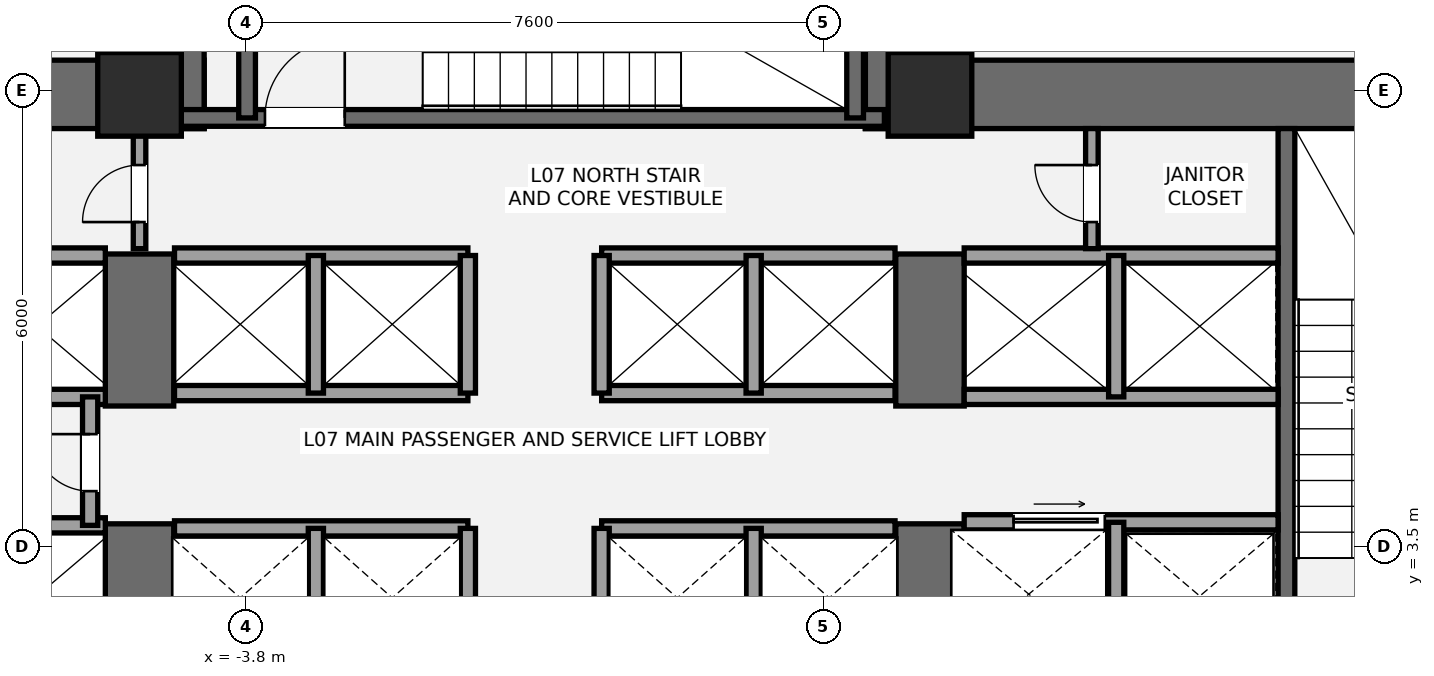
"""IFC4 building model, lengths in metres.
Left out: names, types, materials, properties, quantities, classifications, styles, units other than length and angle.
Written with IfcOpenShell. Run it as: python <this file> out.ifc"""

import sys

from ifc_helpers import new_model, si_unit, direction, frame, frame_2d, origin, origin_2d, place, context, subcontext, project, spatial, rectangle, extrude, element, fill, save


model = new_model("IFC4")
c1 = context("Model", 3, precision=1e-05, world=origin(), true_north=direction((0.0, 1.0)))
c2 = subcontext(c1, "Body", "Model", "MODEL_VIEW")
j1 = project(units=[si_unit("LENGTHUNIT", "METRE"), si_unit("PLANEANGLEUNIT", "RADIAN")], contexts=[c1])
p1 = place(None, origin())
s1 = spatial("IfcSite", under=j1, at=p1, CompositionType="ELEMENT")
p2 = place(p1, origin())
s2 = spatial("IfcBuilding", under=s1, at=p2, CompositionType="ELEMENT")
p3 = place(p2, frame((0.0, 0.0, 30.6)))
s3 = spatial("IfcBuildingStorey", under=s2, at=p3, CompositionType="ELEMENT", Elevation=30.6)
p4 = place(p3, frame((-14.05, 9.45, 0.0), z_axis=(0.0, 0.0, 1.0), x_axis=(1.0, 0.0, 0.0)))
e1 = element("IfcWall", 1, at=p4, inside=s3, PredefinedType="SHEAR", context=c2, shape_type="SweptSolid", body=[
    extrude(rectangle(XDim=9.7, YDim=0.9, at=frame_2d((4.85, 0.0))), origin(), (0.0, 0.0, 1.0), 3.6),
])
p5 = place(p3, frame((-5.2, 0.95, 0.0), z_axis=(0.0, 0.0, 1.0), x_axis=(0.0, 1.0, 0.0)))
e2 = element("IfcWall", 2, at=p5, inside=s3, PredefinedType="SHEAR", context=c2, shape_type="SweptSolid", body=[
    extrude(rectangle(XDim=2.85, YDim=0.9, at=frame_2d((1.425, 0.0))), origin(), (0.0, 0.0, 1.0), 3.6),
])
p6 = place(p3, frame((-5.2, 5.35, 0.0), z_axis=(0.0, 0.0, 1.0), x_axis=(0.0, 1.0, 0.0)))
e3 = element("IfcWall", 3, at=p6, inside=s3, PredefinedType="SHEAR", context=c2, shape_type="SweptSolid", body=[
    extrude(rectangle(XDim=2.0, YDim=0.9, at=frame_2d((1.0, 0.0))), origin(), (0.0, 0.0, 1.0), 3.6),
])
p7 = place(p3, frame((4.35, 9.45, 0.0), z_axis=(0.0, 0.0, 1.0), x_axis=(1.0, 0.0, 0.0)))
e4 = element("IfcWall", 4, at=p7, inside=s3, PredefinedType="SHEAR", context=c2, shape_type="SweptSolid", body=[
    extrude(rectangle(XDim=9.7, YDim=0.9, at=frame_2d((4.85, 0.0))), origin(), (0.0, 0.0, 1.0), 3.6),
])
p8 = place(p3, frame((5.2, 0.95, 0.0), z_axis=(0.0, 0.0, 1.0), x_axis=(0.0, 1.0, 0.0)))
e5 = element("IfcWall", 5, at=p8, inside=s3, PredefinedType="SHEAR", context=c2, shape_type="SweptSolid", body=[
    extrude(rectangle(XDim=2.85, YDim=0.9, at=frame_2d((1.425, 0.0))), origin(), (0.0, 0.0, 1.0), 3.6),
])
p9 = place(p3, frame((5.2, 5.35, 0.0), z_axis=(0.0, 0.0, 1.0), x_axis=(0.0, 1.0, 0.0)))
e6 = element("IfcWall", 6, at=p9, inside=s3, PredefinedType="SHEAR", context=c2, shape_type="SweptSolid", body=[
    extrude(rectangle(XDim=2.0, YDim=0.9, at=frame_2d((1.0, 0.0))), origin(), (0.0, 0.0, 1.0), 3.6),
])
p10 = place(p3, frame((9.89, 1.85, 0.0), z_axis=(0.0, 0.0, 1.0), x_axis=(0.0, 1.0, 0.0)))
e7 = element("IfcWall", 7, at=p10, inside=s3, PredefinedType="SHEAR", context=c2, shape_type="SweptSolid", body=[
    extrude(rectangle(XDim=7.15, YDim=0.22, at=frame_2d((3.575, 0.0))), origin(), (0.0, 0.0, 1.0), 3.6),
])
for number, where, z_axis, x_axis in (
    (8, (-4.8, 9.0, 0.0), (0.0, 0.0, 1.0), (0.0, 1.0, 0.0)),
    (9, (4.8, 9.0, 0.0), (0.0, 0.0, 1.0), (0.0, 1.0, 0.0)),
):
    element("IfcWall", number, at=place(p3, frame(where, z_axis=z_axis, x_axis=x_axis)), inside=s3, PredefinedType="SHEAR", context=c2, shape_type="SweptSolid", body=[
        extrude(rectangle(XDim=4.3, YDim=0.9, at=frame_2d((2.15, 0.0))), origin(), (0.0, 0.0, 1.0), 3.6),
    ])
p11 = place(p3, frame((-4.7, 9.14, 0.0), z_axis=(0.0, 0.0, 1.0), x_axis=(1.0, 0.0, 0.0)))
e10 = element("IfcWall", 10, at=p11, inside=s3, PredefinedType="SHEAR", context=c2, shape_type="SweptSolid", body=[
    extrude(rectangle(XDim=9.3, YDim=0.22, at=frame_2d((4.65, 0.0))), origin(), (0.0, 0.0, 1.0), 3.6),
])
p12 = place(p11, frame((1.15, 0.0, 0.0)))
e11 = element("IfcOpeningElement", 11, at=p12, cuts=e10, PredefinedType="OPENING", context=c2, shape_type="SweptSolid", body=[
    extrude(rectangle(XDim=1.05, YDim=2.15, at=frame_2d((0.525, 1.075))), frame((0.0, 0.12, 0.0), z_axis=(0.0, -1.0, 0.0), x_axis=(1.0, 0.0, 0.0)), (0.0, 0.0, 1.0), 0.24),
])
for number, where, z_axis, x_axis in (
    (12, (-3.785, 9.14, 0.0), (0.0, 0.0, 1.0), (0.0, 1.0, 0.0)),
    (13, (4.215, 9.14, 0.0), (0.0, 0.0, 1.0), (0.0, 1.0, 0.0)),
):
    element("IfcWall", number, at=place(p3, frame(where, z_axis=z_axis, x_axis=x_axis)), inside=s3, PredefinedType="SHEAR", context=c2, shape_type="SweptSolid", body=[
        extrude(rectangle(XDim=3.26, YDim=0.22, at=frame_2d((1.63, 0.0))), origin(), (0.0, 0.0, 1.0), 3.6),
    ])
for number, where, z_axis, x_axis in (
    (14, (-5.2, 9.45, 0.0), (0.0, 0.0, 1.0), (1.0, 0.0, 0.0)),
    (15, (5.2, 9.45, 0.0), (0.0, 0.0, 1.0), (1.0, 0.0, 0.0)),
):
    element("IfcColumn", number, at=place(p3, frame(where, z_axis=z_axis, x_axis=x_axis)), inside=s3, PredefinedType="COLUMN", context=c2, shape_type="SweptSolid", body=[
        extrude(rectangle(XDim=1.1, YDim=1.1, at=origin_2d()), origin(), (0.0, 0.0, 1.0), 3.6),
    ])
for number, where, z_axis, x_axis in (
    (16, (-9.78, 3.78, 0.0), (0.0, 0.0, 1.0), (1.0, 0.0, 0.0)),
    (17, (-9.78, 5.47, 0.0), (0.0, 0.0, 1.0), (1.0, 0.0, 0.0)),
    (18, (-9.78, 7.33, 0.0), (0.0, 0.0, 1.0), (1.0, 0.0, 0.0)),
):
    element("IfcWall", number, at=place(p3, frame(where, z_axis=z_axis, x_axis=x_axis)), inside=s3, PredefinedType="SOLIDWALL", context=c2, shape_type="SweptSolid", body=[
        extrude(rectangle(XDim=4.13, YDim=0.2, at=frame_2d((2.065, 0.0))), origin(), (0.0, 0.0, 1.0), 3.4),
    ])
p13 = place(p3, frame((-5.85, 3.78, 0.0), z_axis=(0.0, 0.0, 1.0), x_axis=(0.0, 1.0, 0.0)))
e19 = element("IfcWall", 19, at=p13, inside=s3, PredefinedType="SOLIDWALL", context=c2, shape_type="SweptSolid", body=[
    extrude(rectangle(XDim=1.69, YDim=0.2, at=frame_2d((0.845, 0.0))), origin(), (0.0, 0.0, 1.0), 3.4),
])
p14 = place(p13, frame((0.45, 0.0, 0.0)))
e20 = element("IfcOpeningElement", 20, at=p14, cuts=e19, PredefinedType="OPENING", context=c2, shape_type="SweptSolid", body=[
    extrude(rectangle(XDim=0.75, YDim=2.1, at=frame_2d((0.375, 1.05))), frame((0.0, 0.11, 0.0), z_axis=(0.0, -1.0, 0.0), x_axis=(1.0, 0.0, 0.0)), (0.0, 0.0, 1.0), 0.22),
])
p15 = place(p3, frame((5.65, 3.82, 0.0), z_axis=(0.0, 0.0, 1.0), x_axis=(1.0, 0.0, 0.0)))
e21 = element("IfcWall", 21, at=p15, inside=s3, PredefinedType="SOLIDWALL", context=c2, shape_type="SweptSolid", body=[
    extrude(rectangle(XDim=4.13, YDim=0.2, at=frame_2d((2.065, 0.0))), origin(), (0.0, 0.0, 1.0), 3.4),
])
p16 = place(p15, frame((0.65, 0.0, 0.0)))
e22 = element("IfcOpeningElement", 22, at=p16, cuts=e21, PredefinedType="OPENING", context=c2, shape_type="SweptSolid", body=[
    extrude(rectangle(XDim=1.2, YDim=2.2, at=frame_2d((0.6, 1.1))), frame((0.0, 0.11, 0.0), z_axis=(0.0, -1.0, 0.0), x_axis=(1.0, 0.0, 0.0)), (0.0, 0.0, 1.0), 0.22),
])
p17 = place(p3, frame((7.65, 1.85, 0.0), z_axis=(0.0, 0.0, 1.0), x_axis=(0.0, 1.0, 0.0)))
e23 = element("IfcWall", 23, at=p17, inside=s3, PredefinedType="SOLIDWALL", context=c2, shape_type="SweptSolid", body=[
    extrude(rectangle(XDim=1.97, YDim=0.2, at=frame_2d((0.985, 0.0))), origin(), (0.0, 0.0, 1.0), 3.4),
])
for number, where, z_axis, x_axis in (
    (24, (5.65, 5.47, 0.0), (0.0, 0.0, 1.0), (1.0, 0.0, 0.0)),
    (25, (5.65, 7.33, 0.0), (0.0, 0.0, 1.0), (1.0, 0.0, 0.0)),
):
    element("IfcWall", number, at=place(p3, frame(where, z_axis=z_axis, x_axis=x_axis)), inside=s3, PredefinedType="SOLIDWALL", context=c2, shape_type="SweptSolid", body=[
        extrude(rectangle(XDim=4.13, YDim=0.2, at=frame_2d((2.065, 0.0))), origin(), (0.0, 0.0, 1.0), 3.4),
    ])
p18 = place(p3, frame((7.65, 5.47, 0.0), z_axis=(0.0, 0.0, 1.0), x_axis=(0.0, 1.0, 0.0)))
e26 = element("IfcWall", 26, at=p18, inside=s3, PredefinedType="SOLIDWALL", context=c2, shape_type="SweptSolid", body=[
    extrude(rectangle(XDim=1.86, YDim=0.2, at=frame_2d((0.93, 0.0))), origin(), (0.0, 0.0, 1.0), 3.4),
])
for number, where, z_axis, x_axis in (
    (27, (-4.74, 3.74, 0.0), (0.0, 0.0, 1.0), (1.0, 0.0, 0.0)),
    (28, (0.88, 3.74, 0.0), (0.0, 0.0, 1.0), (1.0, 0.0, 0.0)),
):
    element("IfcWall", number, at=place(p3, frame(where, z_axis=z_axis, x_axis=x_axis)), inside=s3, PredefinedType="SOLIDWALL", context=c2, shape_type="SweptSolid", body=[
        extrude(rectangle(XDim=3.86, YDim=0.2, at=frame_2d((1.93, 0.0))), origin(), (0.0, 0.0, 1.0), 3.4),
    ])
for number, where, z_axis, x_axis in (
    (29, (-2.88, 1.92, 0.0), (0.0, 0.0, 1.0), (0.0, 1.0, 0.0)),
    (30, (2.88, 1.92, 0.0), (0.0, 0.0, 1.0), (0.0, 1.0, 0.0)),
    (31, (-0.88, 1.92, 0.0), (0.0, 0.0, 1.0), (0.0, 1.0, 0.0)),
    (32, (0.88, 1.92, 0.0), (0.0, 0.0, 1.0), (0.0, 1.0, 0.0)),
):
    element("IfcWall", number, at=place(p3, frame(where, z_axis=z_axis, x_axis=x_axis)), inside=s3, PredefinedType="SOLIDWALL", context=c2, shape_type="SweptSolid", body=[
        extrude(rectangle(XDim=1.82, YDim=0.2, at=frame_2d((0.91, 0.0))), origin(), (0.0, 0.0, 1.0), 3.4),
    ])
for number, where, z_axis, x_axis in (
    (33, (-4.74, 5.52, 0.0), (0.0, 0.0, 1.0), (1.0, 0.0, 0.0)),
    (34, (0.88, 5.52, 0.0), (0.0, 0.0, 1.0), (1.0, 0.0, 0.0)),
    (35, (-4.74, 7.33, 0.0), (0.0, 0.0, 1.0), (1.0, 0.0, 0.0)),
    (36, (0.88, 7.33, 0.0), (0.0, 0.0, 1.0), (1.0, 0.0, 0.0)),
):
    element("IfcWall", number, at=place(p3, frame(where, z_axis=z_axis, x_axis=x_axis)), inside=s3, PredefinedType="SOLIDWALL", context=c2, shape_type="SweptSolid", body=[
        extrude(rectangle(XDim=3.86, YDim=0.2, at=frame_2d((1.93, 0.0))), origin(), (0.0, 0.0, 1.0), 3.4),
    ])
for number, where, z_axis, x_axis in (
    (37, (-2.88, 5.52, 0.0), (0.0, 0.0, 1.0), (0.0, 1.0, 0.0)),
    (38, (2.88, 5.52, 0.0), (0.0, 0.0, 1.0), (0.0, 1.0, 0.0)),
    (39, (-0.88, 5.52, 0.0), (0.0, 0.0, 1.0), (0.0, 1.0, 0.0)),
    (40, (0.88, 5.52, 0.0), (0.0, 0.0, 1.0), (0.0, 1.0, 0.0)),
):
    element("IfcWall", number, at=place(p3, frame(where, z_axis=z_axis, x_axis=x_axis)), inside=s3, PredefinedType="SOLIDWALL", context=c2, shape_type="SweptSolid", body=[
        extrude(rectangle(XDim=1.81, YDim=0.2, at=frame_2d((0.905, 0.0))), origin(), (0.0, 0.0, 1.0), 3.4),
    ])
p19 = place(p3, frame((-5.2, 7.42, 0.0), z_axis=(0.0, 0.0, 1.0), x_axis=(0.0, 1.0, 0.0)))
e41 = element("IfcWall", 41, at=p19, inside=s3, PredefinedType="PARTITIONING", context=c2, shape_type="SweptSolid", body=[
    extrude(rectangle(XDim=1.58, YDim=0.165, at=frame_2d((0.79, 0.0))), origin(), (0.0, 0.0, 1.0), 3.4),
])
p20 = place(p19, frame((0.35, 0.0, 0.0)))
e42 = element("IfcOpeningElement", 42, at=p20, cuts=e41, PredefinedType="OPENING", context=c2, shape_type="SweptSolid", body=[
    extrude(rectangle(XDim=0.75, YDim=2.1, at=frame_2d((0.375, 1.05))), frame((0.0, 0.093, 0.0), z_axis=(0.0, -1.0, 0.0), x_axis=(1.0, 0.0, 0.0)), (0.0, 0.0, 1.0), 0.185),
])
p21 = place(p3, frame((7.33, 7.42, 0.0), z_axis=(0.0, 0.0, 1.0), x_axis=(0.0, 1.0, 0.0)))
e43 = element("IfcWall", 43, at=p21, inside=s3, PredefinedType="PARTITIONING", context=c2, shape_type="SweptSolid", body=[
    extrude(rectangle(XDim=1.58, YDim=0.165, at=frame_2d((0.79, 0.0))), origin(), (0.0, 0.0, 1.0), 3.4),
])
p22 = place(p21, frame((0.35, 0.0, 0.0)))
e44 = element("IfcOpeningElement", 44, at=p22, cuts=e43, PredefinedType="OPENING", context=c2, shape_type="SweptSolid", body=[
    extrude(rectangle(XDim=0.75, YDim=2.1, at=frame_2d((0.375, 1.05))), frame((0.0, 0.093, 0.0), z_axis=(0.0, -1.0, 0.0), x_axis=(1.0, 0.0, 0.0)), (0.0, 0.0, 1.0), 0.185),
])
p23 = place(p12, origin())
e45 = element("IfcDoor", 45, at=p23, inside=s3, OperationType="SINGLE_SWING_RIGHT", PredefinedType="DOOR", context=c2, shape_type="SweptSolid", body=[
    extrude(rectangle(XDim=1.05, YDim=2.15, at=frame_2d((0.525, 1.075))), frame((0.0, 0.025, 0.0), z_axis=(0.0, -1.0, 0.0), x_axis=(1.0, 0.0, 0.0)), (0.0, 0.0, 1.0), 0.05),
])
fill(e11, e45)
p24 = place(p14, origin())
e46 = element("IfcDoor", 46, at=p24, inside=s3, OperationType="SINGLE_SWING_RIGHT", PredefinedType="DOOR", context=c2, shape_type="SweptSolid", body=[
    extrude(rectangle(XDim=0.75, YDim=2.1, at=frame_2d((0.375, 1.05))), frame((0.0, 0.025, 0.0), z_axis=(0.0, -1.0, 0.0), x_axis=(1.0, 0.0, 0.0)), (0.0, 0.0, 1.0), 0.05),
])
fill(e20, e46)
p25 = place(p16, origin())
e47 = element("IfcDoor", 47, at=p25, inside=s3, OperationType="SLIDING_TO_RIGHT", PredefinedType="DOOR", context=c2, shape_type="SweptSolid", body=[
    extrude(rectangle(XDim=1.2, YDim=2.2, at=frame_2d((0.6, 1.1))), frame((0.0, 0.025, 0.0), z_axis=(0.0, -1.0, 0.0), x_axis=(1.0, 0.0, 0.0)), (0.0, 0.0, 1.0), 0.05),
])
fill(e22, e47)
p26 = place(p20, origin())
e48 = element("IfcDoor", 48, at=p26, inside=s3, OperationType="SINGLE_SWING_LEFT", PredefinedType="DOOR", context=c2, shape_type="SweptSolid", body=[
    extrude(rectangle(XDim=0.75, YDim=2.1, at=frame_2d((0.375, 1.05))), frame((0.0, 0.025, 0.0), z_axis=(0.0, -1.0, 0.0), x_axis=(1.0, 0.0, 0.0)), (0.0, 0.0, 1.0), 0.05),
])
fill(e42, e48)
p27 = place(p22, origin())
e49 = element("IfcDoor", 49, at=p27, inside=s3, OperationType="SINGLE_SWING_RIGHT", PredefinedType="DOOR", context=c2, shape_type="SweptSolid", body=[
    extrude(rectangle(XDim=0.75, YDim=2.1, at=frame_2d((0.375, 1.05))), frame((0.0, 0.025, 0.0), z_axis=(0.0, -1.0, 0.0), x_axis=(1.0, 0.0, 0.0)), (0.0, 0.0, 1.0), 0.05),
])
fill(e44, e49)
save(model, sys.argv[1])
